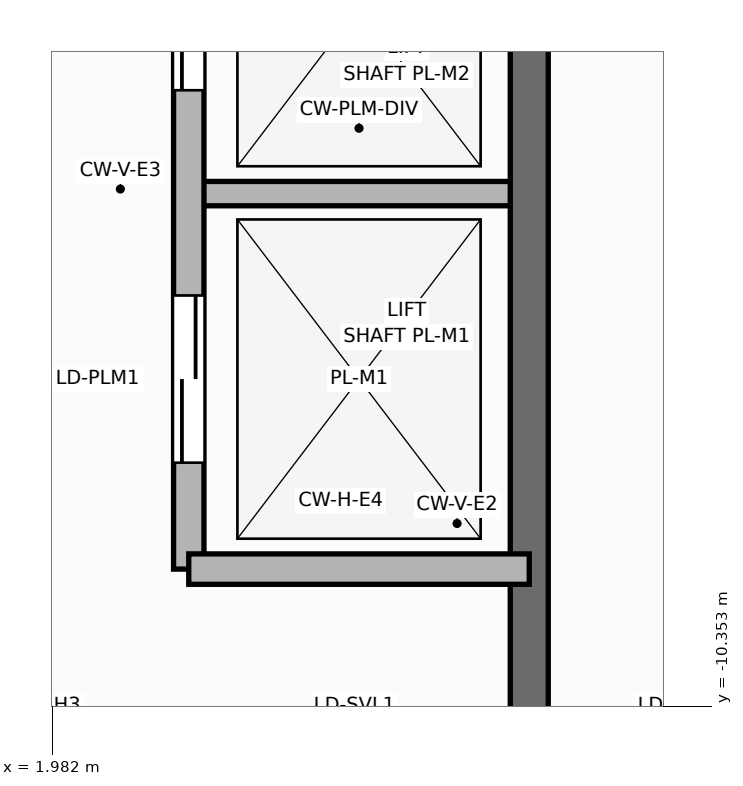
"""IFC4 building model, lengths in metres.
Left out: names, types, materials, properties, quantities, classifications, styles, units other than length and angle.
Written with IfcOpenShell. Run it as: python <this file> out.ifc"""

import sys

from ifc_helpers import new_model, si_unit, direction, frame, frame_2d, origin, place, context, subcontext, project, spatial, rectangle, extrude, element, fill, save


model = new_model("IFC4")
c1 = context("Model", 3, precision=1e-05, world=origin(), true_north=direction((0.0, 1.0)))
c2 = subcontext(c1, "Body", "Model", "MODEL_VIEW")
j1 = project(units=[si_unit("LENGTHUNIT", "METRE"), si_unit("PLANEANGLEUNIT", "RADIAN")], contexts=[c1])
p1 = place(None, origin())
s1 = spatial("IfcSite", under=j1, at=p1, CompositionType="ELEMENT")
p2 = place(p1, origin())
s2 = spatial("IfcBuilding", under=s1, at=p2, CompositionType="ELEMENT")
p3 = place(p2, origin())
s3 = spatial("IfcBuildingStorey", under=s2, at=p3, CompositionType="ELEMENT", Elevation=0.0)
p4 = place(p3, frame((5.583, 11.29, -0.015), z_axis=(0.0, 0.0, 1.0), x_axis=(0.616945483616, -0.787005889588, 0.0)))
e1 = element("IfcWall", 1, at=p4, inside=s3, PredefinedType="STANDARD", context=c2, shape_type="SweptSolid", body=[
    extrude(rectangle(XDim=28.627, YDim=0.28, at=frame_2d((14.314, 0.0))), origin(), (0.0, 0.0, 1.0), 3.91),
])
p5 = place(p4, frame((2.979, 0.0, 0.015)))
e2 = element("IfcOpeningElement", 2, at=p5, cuts=e1, PredefinedType="OPENING", context=c2, shape_type="SweptSolid", body=[
    extrude(rectangle(XDim=1.206, YDim=2.154, at=frame_2d((0.6, 1.077))), frame((0.0, 0.15, 0.0), z_axis=(0.0, -1.0, 0.0), x_axis=(1.0, 0.0, 0.0)), (0.0, 0.0, 1.0), 0.3),
])
p6 = place(p3, frame((2.88, -6.98, 0.0), z_axis=(0.0, 0.0, 1.0), x_axis=(1.0, 0.0, 0.0)))
e3 = element("IfcWall", 3, at=p6, inside=s3, PredefinedType="PARTITIONING", context=c2, shape_type="SweptSolid", body=[
    extrude(rectangle(XDim=2.24, YDim=0.16, at=frame_2d((1.12, 0.0))), origin(), (0.0, 0.0, 1.0), 5.12),
])
p7 = place(p3, frame((5.12, -13.85, 0.0), z_axis=(0.0, 0.0, 1.0), x_axis=(0.0, 1.0, 0.0)))
e4 = element("IfcWall", 4, at=p7, inside=s3, PredefinedType="SHEAR", context=c2, shape_type="SweptSolid", body=[
    extrude(rectangle(XDim=9.4, YDim=0.25, at=frame_2d((4.7, 0.0))), origin(), (0.0, 0.0, 1.0), 5.4),
])
p8 = place(p3, frame((2.88, -9.45, 0.0), z_axis=(0.0, 0.0, 1.0), x_axis=(0.0, 1.0, 0.0)))
e5 = element("IfcWall", 5, at=p8, inside=s3, PredefinedType="SOLIDWALL", context=c2, shape_type="SweptSolid", body=[
    extrude(rectangle(XDim=5.0, YDim=0.2, at=frame_2d((2.5, 0.0))), origin(), (0.0, 0.0, 1.0), 5.12),
])
p9 = place(p8, frame((0.7, 0.0, 0.0)))
e6 = element("IfcOpeningElement", 6, at=p9, cuts=e5, PredefinedType="OPENING", context=c2, shape_type="SweptSolid", body=[
    extrude(rectangle(XDim=1.106, YDim=2.104, at=frame_2d((0.55, 1.052))), frame((0.0, 0.11, 0.0), z_axis=(0.0, -1.0, 0.0), x_axis=(1.0, 0.0, 0.0)), (0.0, 0.0, 1.0), 0.22),
])
p10 = place(p8, frame((3.15, 0.0, 0.0)))
e7 = element("IfcOpeningElement", 7, at=p10, cuts=e5, PredefinedType="OPENING", context=c2, shape_type="SweptSolid", body=[
    extrude(rectangle(XDim=1.106, YDim=2.104, at=frame_2d((0.55, 1.052))), frame((0.0, 0.11, 0.0), z_axis=(0.0, -1.0, 0.0), x_axis=(1.0, 0.0, 0.0)), (0.0, 0.0, 1.0), 0.22),
])
p11 = place(p3, frame((2.88, -9.45, 0.0), z_axis=(0.0, 0.0, 1.0), x_axis=(1.0, 0.0, 0.0)))
e8 = element("IfcWall", 8, at=p11, inside=s3, PredefinedType="SOLIDWALL", context=c2, shape_type="SweptSolid", body=[
    extrude(rectangle(XDim=2.24, YDim=0.2, at=frame_2d((1.12, 0.0))), origin(), (0.0, 0.0, 1.0), 5.12),
])
p12 = place(p9, origin())
e9 = element("IfcDoor", 9, at=p12, inside=s3, OperationType="DOUBLE_DOOR_SLIDING", PredefinedType="DOOR", context=c2, shape_type="SweptSolid", body=[
    extrude(rectangle(XDim=1.1, YDim=2.1, at=frame_2d((0.55, 1.05))), frame((0.0, 0.025, 0.0), z_axis=(0.0, -1.0, 0.0), x_axis=(1.0, 0.0, 0.0)), (0.0, 0.0, 1.0), 0.05),
])
fill(e6, e9)
p13 = place(p10, origin())
e10 = element("IfcDoor", 10, at=p13, inside=s3, OperationType="DOUBLE_DOOR_SLIDING", PredefinedType="DOOR", context=c2, shape_type="SweptSolid", body=[
    extrude(rectangle(XDim=1.1, YDim=2.1, at=frame_2d((0.55, 1.05))), frame((0.0, 0.025, 0.0), z_axis=(0.0, -1.0, 0.0), x_axis=(1.0, 0.0, 0.0)), (0.0, 0.0, 1.0), 0.05),
])
fill(e7, e10)
save(model, sys.argv[1])
